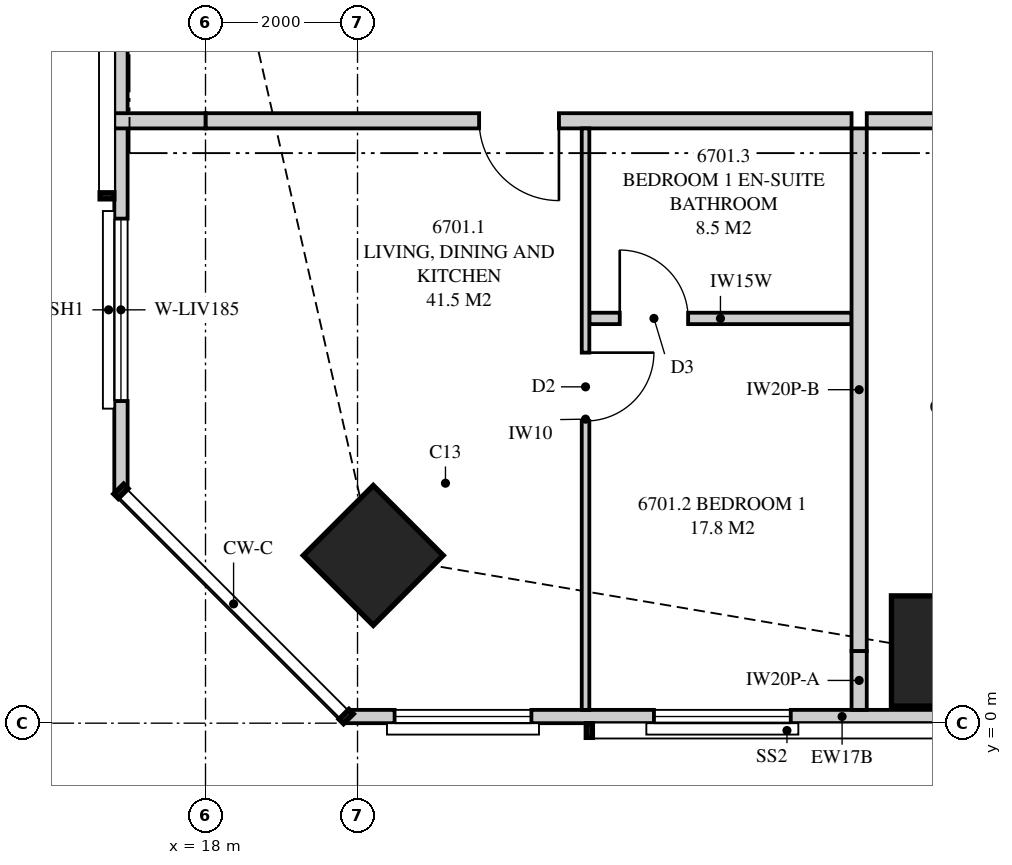
"""IFC4 building model, lengths in metres.
Left out: names, types, materials, properties, quantities, classifications, styles, units other than length and angle.
Written with IfcOpenShell. Run it as: python <this file> out.ifc"""

import sys

from ifc_helpers import new_model, si_unit, direction, frame, frame_2d, origin, origin_2d, place, context, subcontext, project, spatial, polyline, rectangle, outline, extrude, element, fill, save


model = new_model("IFC4")
c1 = context("Model", 3, precision=1e-05, world=origin(), true_north=direction((0.0, 1.0)))
c2 = subcontext(c1, "Body", "Model", "MODEL_VIEW")
j1 = project(units=[si_unit("LENGTHUNIT", "METRE"), si_unit("PLANEANGLEUNIT", "RADIAN")], contexts=[c1])
p1 = place(None, origin())
s1 = spatial("IfcSite", under=j1, at=p1, CompositionType="ELEMENT")
p2 = place(p1, origin())
s2 = spatial("IfcBuilding", under=s1, at=p2, CompositionType="ELEMENT")
p3 = place(p2, frame((0.0, 0.0, 245.95)))
s3 = spatial("IfcBuildingStorey", under=s2, at=p3, CompositionType="ELEMENT", Elevation=245.95)
p4 = place(p3, frame((20.207, 2.207, 0.0), z_axis=(0.0, 0.0, 1.0), x_axis=(0.707106781187, 0.707106781187, 0.0)))
e1 = element("IfcColumn", 1, at=p4, inside=s3, PredefinedType="COLUMN", context=c2, shape_type="SweptSolid", body=[
    extrude(rectangle(XDim=1.3, YDim=1.3, at=origin_2d()), origin(), (0.0, 0.0, 1.0), 3.5),
])
p5 = place(p3, frame((27.625, 0.95, 0.0), z_axis=(0.0, 0.0, 1.0), x_axis=(0.0, 1.0, 0.0)))
e2 = element("IfcColumn", 2, at=p5, inside=s3, PredefinedType="COLUMN", context=c2, shape_type="SweptSolid", body=[
    extrude(rectangle(XDim=1.45, YDim=1.2, at=origin_2d()), origin(), (0.0, 0.0, 1.0), 3.5),
])
p6 = place(p3, frame((19.851, 0.087, 0.0), z_axis=(0.0, 0.0, 1.0), x_axis=(1.0, 0.0, 0.0)))
e3 = element("IfcWall", 3, at=p6, inside=s3, PredefinedType="SOLIDWALL", context=c2, shape_type="SweptSolid", body=[
    extrude(outline(polyline([(0.0, 0.0), (13.049, 0.0), (13.049, 2.3), (7.774, 2.3), (7.774, 3.26), (7.642, 3.26), (7.642, 2.3), (7.559, 2.3), (7.559, 3.26), (0.0, 3.26), (0.0, 0.0)])), frame((0.0, 0.087, 0.0), z_axis=(0.0, -1.0, 0.0), x_axis=(1.0, 0.0, 0.0)), (0.0, 0.0, 1.0), 0.175),
])
p7 = place(p6, frame((0.636, 0.0, 0.4)))
e4 = element("IfcOpeningElement", 4, at=p7, cuts=e3, PredefinedType="OPENING", context=c2, shape_type="SweptSolid", body=[
    extrude(rectangle(XDim=1.8, YDim=1.85, at=frame_2d((0.9, 0.925))), frame((0.0, 0.097, 0.0), z_axis=(0.0, -1.0, 0.0), x_axis=(1.0, 0.0, 0.0)), (0.0, 0.0, 1.0), 0.195),
])
p8 = place(p6, frame((4.049, 0.0, 0.4)))
e5 = element("IfcOpeningElement", 5, at=p8, cuts=e3, PredefinedType="OPENING", context=c2, shape_type="SweptSolid", body=[
    extrude(rectangle(XDim=1.8, YDim=1.85, at=frame_2d((0.9, 0.925))), frame((0.0, 0.097, 0.0), z_axis=(0.0, -1.0, 0.0), x_axis=(1.0, 0.0, 0.0)), (0.0, 0.0, 1.0), 0.195),
])
p9 = place(p6, frame((8.699, 0.0, 0.4)))
e6 = element("IfcOpeningElement", 6, at=p9, cuts=e3, PredefinedType="OPENING", context=c2, shape_type="SweptSolid", body=[
    extrude(rectangle(XDim=2.4, YDim=1.85, at=frame_2d((1.2, 0.925))), frame((0.0, 0.097, 0.0), z_axis=(0.0, -1.0, 0.0), x_axis=(1.0, 0.0, 0.0)), (0.0, 0.0, 1.0), 0.195),
])
p10 = place(p3, frame((16.887, 30.949, 0.0), z_axis=(0.0, 0.0, 1.0), x_axis=(0.0, -1.0, 0.0)))
e7 = element("IfcWall", 7, at=p10, inside=s3, PredefinedType="SOLIDWALL", context=c2, shape_type="SweptSolid", body=[
    extrude(outline(polyline([(0.0, 0.0), (27.897, 0.0), (27.897, 3.26), (18.148, 3.26), (18.148, 2.3), (18.125, 2.3), (18.125, 3.26), (17.949, 3.26), (17.949, 2.3), (5.949, 2.3), (5.949, 3.26), (0.0, 3.26), (0.0, 0.0)])), frame((0.0, 0.087, 0.0), z_axis=(0.0, -1.0, 0.0), x_axis=(1.0, 0.0, 0.0)), (0.0, 0.0, 1.0), 0.175),
])
p11 = place(p10, frame((11.849, 0.0, 0.4)))
e8 = element("IfcOpeningElement", 8, at=p11, cuts=e7, PredefinedType="OPENING", context=c2, shape_type="SweptSolid", body=[
    extrude(rectangle(XDim=1.2, YDim=1.85, at=frame_2d((0.6, 0.925))), frame((0.0, 0.097, 0.0), z_axis=(0.0, -1.0, 0.0), x_axis=(1.0, 0.0, 0.0)), (0.0, 0.0, 1.0), 0.195),
])
p12 = place(p10, frame((24.311, 0.0, 0.4)))
e9 = element("IfcOpeningElement", 9, at=p12, cuts=e7, PredefinedType="OPENING", context=c2, shape_type="SweptSolid", body=[
    extrude(rectangle(XDim=2.4, YDim=1.85, at=frame_2d((1.2, 0.925))), frame((0.0, 0.097, 0.0), z_axis=(0.0, -1.0, 0.0), x_axis=(1.0, 0.0, 0.0)), (0.0, 0.0, 1.0), 0.195),
])
p13 = place(p3, frame((26.6, 0.175, 0.0), z_axis=(0.0, 0.0, 1.0), x_axis=(0.0, 1.0, 0.0)))
e10 = element("IfcWall", 10, at=p13, inside=s3, PredefinedType="PARTITIONING", context=c2, shape_type="SweptSolid", body=[
    extrude(outline(polyline([(0.0, 0.0), (0.775, 0.0), (0.775, 2.3), (0.026, 2.3), (0.026, 3.26), (0.0, 3.26), (0.0, 0.0)])), frame((0.0, 0.1, 0.0), z_axis=(0.0, -1.0, 0.0), x_axis=(1.0, 0.0, 0.0)), (0.0, 0.0, 1.0), 0.2),
])
p14 = place(p3, frame((26.6, 0.95, 0.0), z_axis=(0.0, 0.0, 1.0), x_axis=(0.0, 1.0, 0.0)))
e11 = element("IfcWall", 11, at=p14, inside=s3, PredefinedType="PARTITIONING", context=c2, shape_type="SweptSolid", body=[
    extrude(outline(polyline([(0.0, 0.0), (6.875, 0.0), (6.875, 2.66), (1.097, 2.66), (1.097, 2.3), (0.0, 2.3), (0.0, 0.0)])), frame((0.0, 0.1, 0.0), z_axis=(0.0, -1.0, 0.0), x_axis=(1.0, 0.0, 0.0)), (0.0, 0.0, 1.0), 0.2),
])
p15 = place(p3, frame((18.0, 7.925, 0.0), z_axis=(0.0, 0.0, 1.0), x_axis=(1.0, 0.0, 0.0)))
e12 = element("IfcWall", 12, at=p15, inside=s3, PredefinedType="PARTITIONING", context=c2, shape_type="SweptSolid", body=[
    extrude(outline(polyline([(0.0, 0.0), (8.5, 0.0), (8.5, 3.26), (8.5, 2.66), (8.315, 2.66), (8.315, 3.26), (1.839, 3.26), (1.839, 2.3), (0.0, 2.3), (0.0, 3.26), (0.0, 0.0)])), frame((0.0, 0.1, 0.0), z_axis=(0.0, -1.0, 0.0), x_axis=(1.0, 0.0, 0.0)), (0.0, 0.0, 1.0), 0.2),
])
p16 = place(p15, frame((3.6, 0.0, 0.0)))
e13 = element("IfcOpeningElement", 13, at=p16, cuts=e12, PredefinedType="OPENING", context=c2, shape_type="SweptSolid", body=[
    extrude(rectangle(XDim=1.05, YDim=2.2, at=frame_2d((0.525, 1.1))), frame((0.0, 0.11, 0.0), z_axis=(0.0, -1.0, 0.0), x_axis=(1.0, 0.0, 0.0)), (0.0, 0.0, 1.0), 0.22),
])
p17 = place(p3, frame((23.0, 0.175, 0.0), z_axis=(0.0, 0.0, 1.0), x_axis=(0.0, 1.0, 0.0)))
e14 = element("IfcWall", 14, at=p17, inside=s3, PredefinedType="PARTITIONING", context=c2, shape_type="SweptSolid", body=[
    extrude(outline(polyline([(0.0, 0.0), (7.65, 0.0), (7.65, 3.26), (2.431, 3.26), (2.431, 2.3), (0.687, 2.3), (0.687, 3.26), (0.0, 3.26), (0.0, 0.0)])), frame((0.0, 0.05, 0.0), z_axis=(0.0, -1.0, 0.0), x_axis=(1.0, 0.0, 0.0)), (0.0, 0.0, 1.0), 0.1),
])
p18 = place(p17, frame((3.8, 0.0, 0.0)))
e15 = element("IfcOpeningElement", 15, at=p18, cuts=e14, PredefinedType="OPENING", context=c2, shape_type="SweptSolid", body=[
    extrude(rectangle(XDim=0.9, YDim=2.1, at=frame_2d((0.45, 1.05))), frame((0.0, 0.06, 0.0), z_axis=(0.0, -1.0, 0.0), x_axis=(1.0, 0.0, 0.0)), (0.0, 0.0, 1.0), 0.12),
])
p19 = place(p3, frame((23.05, 5.325, 0.0), z_axis=(0.0, 0.0, 1.0), x_axis=(1.0, 0.0, 0.0)))
e16 = element("IfcWall", 16, at=p19, inside=s3, PredefinedType="PLUMBINGWALL", context=c2, shape_type="SweptSolid", body=[
    extrude(outline(polyline([(0.0, 0.0), (3.45, 0.0), (3.45, 3.26), (3.45, 2.66), (3.29, 2.66), (3.29, 3.26), (0.0, 3.26), (0.0, 0.0)])), frame((0.0, 0.075, 0.0), z_axis=(0.0, -1.0, 0.0), x_axis=(1.0, 0.0, 0.0)), (0.0, 0.0, 1.0), 0.15),
])
p20 = place(p19, frame((0.4, 0.0, 0.0)))
e17 = element("IfcOpeningElement", 17, at=p20, cuts=e16, PredefinedType="OPENING", context=c2, shape_type="SweptSolid", body=[
    extrude(rectangle(XDim=0.9, YDim=2.1, at=frame_2d((0.45, 1.05))), frame((0.0, 0.085, 0.0), z_axis=(0.0, -1.0, 0.0), x_axis=(1.0, 0.0, 0.0)), (0.0, 0.0, 1.0), 0.17),
])
p21 = place(p3, frame((26.7, 7.925, 0.0), z_axis=(0.0, 0.0, 1.0), x_axis=(1.0, 0.0, 0.0)))
e18 = element("IfcWall", 18, at=p21, inside=s3, PredefinedType="PARTITIONING", context=c2, shape_type="SweptSolid", body=[
    extrude(outline(polyline([(0.0, 0.0), (9.65, 0.0), (9.65, 3.26), (9.65, 2.66), (9.24, 2.66), (9.24, 3.26), (2.235, 3.26), (2.235, 2.66), (0.0, 2.66), (0.0, 3.26), (0.0, 0.0)])), frame((0.0, 0.1, 0.0), z_axis=(0.0, -1.0, 0.0), x_axis=(1.0, 0.0, 0.0)), (0.0, 0.0, 1.0), 0.2),
])
p22 = place(p21, frame((4.325, 0.0, 0.0)))
e19 = element("IfcOpeningElement", 19, at=p22, cuts=e18, PredefinedType="OPENING", context=c2, shape_type="SweptSolid", body=[
    extrude(rectangle(XDim=1.05, YDim=2.2, at=frame_2d((0.525, 1.1))), frame((0.0, 0.11, 0.0), z_axis=(0.0, -1.0, 0.0), x_axis=(1.0, 0.0, 0.0)), (0.0, 0.0, 1.0), 0.22),
])
p23 = place(p3, frame((16.8, 7.925, 0.0), z_axis=(0.0, 0.0, 1.0), x_axis=(1.0, 0.0, 0.0)))
e20 = element("IfcWall", 20, at=p23, inside=s3, PredefinedType="PARTITIONING", context=c2, shape_type="SweptSolid", body=[
    extrude(outline(polyline([(0.0, 0.0), (1.2, 0.0), (1.2, 3.26), (1.2, 2.3), (1.172, 2.3), (1.172, 3.26), (0.0, 3.26), (0.0, 0.0)])), frame((0.0, 0.1, 0.0), z_axis=(0.0, -1.0, 0.0), x_axis=(1.0, 0.0, 0.0)), (0.0, 0.0, 1.0), 0.2),
])
p24 = place(p7, origin())
e21 = element("IfcWindow", 21, at=p24, inside=s3, PartitioningType="SINGLE_PANEL", PredefinedType="WINDOW", context=c2, shape_type="SweptSolid", body=[
    extrude(rectangle(XDim=1.8, YDim=1.85, at=frame_2d((0.9, 0.925))), frame((0.0, 0.03, 0.0), z_axis=(0.0, -1.0, 0.0), x_axis=(1.0, 0.0, 0.0)), (0.0, 0.0, 1.0), 0.06),
])
fill(e4, e21)
p25 = place(p8, origin())
e22 = element("IfcWindow", 22, at=p25, inside=s3, PartitioningType="SINGLE_PANEL", PredefinedType="WINDOW", context=c2, shape_type="SweptSolid", body=[
    extrude(rectangle(XDim=1.8, YDim=1.85, at=frame_2d((0.9, 0.925))), frame((0.0, 0.03, 0.0), z_axis=(0.0, -1.0, 0.0), x_axis=(1.0, 0.0, 0.0)), (0.0, 0.0, 1.0), 0.06),
])
fill(e5, e22)
p26 = place(p12, origin())
e23 = element("IfcWindow", 23, at=p26, inside=s3, PartitioningType="SINGLE_PANEL", PredefinedType="WINDOW", context=c2, shape_type="SweptSolid", body=[
    extrude(rectangle(XDim=2.4, YDim=1.85, at=frame_2d((1.2, 0.925))), frame((0.0, 0.03, 0.0), z_axis=(0.0, -1.0, 0.0), x_axis=(1.0, 0.0, 0.0)), (0.0, 0.0, 1.0), 0.06),
])
fill(e9, e23)
p27 = place(p16, frame((1.05, 0.0, 0.0), z_axis=(0.0, 0.0, 1.0), x_axis=(-1.0, 0.0, 0.0)))
e24 = element("IfcDoor", 24, at=p27, inside=s3, OperationType="SINGLE_SWING_LEFT", PredefinedType="DOOR", context=c2, shape_type="SweptSolid", body=[
    extrude(rectangle(XDim=1.05, YDim=2.2, at=frame_2d((0.525, 1.1))), frame((0.0, 0.025, 0.0), z_axis=(0.0, -1.0, 0.0), x_axis=(1.0, 0.0, 0.0)), (0.0, 0.0, 1.0), 0.05),
])
fill(e13, e24)
p28 = place(p18, frame((0.9, 0.0, 0.0), z_axis=(0.0, 0.0, 1.0), x_axis=(-1.0, 0.0, 0.0)))
e25 = element("IfcDoor", 25, at=p28, inside=s3, OperationType="SINGLE_SWING_LEFT", PredefinedType="DOOR", context=c2, shape_type="SweptSolid", body=[
    extrude(rectangle(XDim=0.9, YDim=2.1, at=frame_2d((0.45, 1.05))), frame((0.0, 0.025, 0.0), z_axis=(0.0, -1.0, 0.0), x_axis=(1.0, 0.0, 0.0)), (0.0, 0.0, 1.0), 0.05),
])
fill(e15, e25)
p29 = place(p20, origin())
e26 = element("IfcDoor", 26, at=p29, inside=s3, OperationType="SINGLE_SWING_LEFT", PredefinedType="DOOR", context=c2, shape_type="SweptSolid", body=[
    extrude(rectangle(XDim=0.9, YDim=2.1, at=frame_2d((0.45, 1.05))), frame((0.0, 0.025, 0.0), z_axis=(0.0, -1.0, 0.0), x_axis=(1.0, 0.0, 0.0)), (0.0, 0.0, 1.0), 0.05),
])
fill(e17, e26)
save(model, sys.argv[1])
